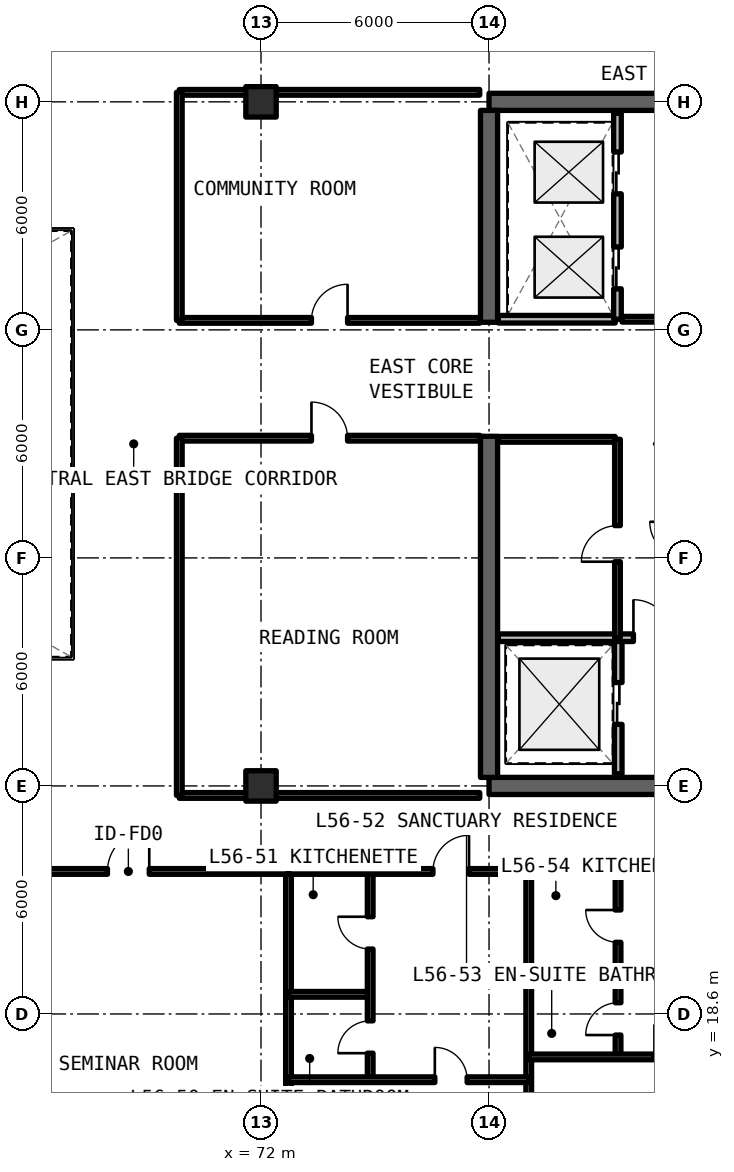
"""IFC4 building model, lengths in metres.
Left out: names, types, materials, properties, quantities, classifications, styles, units other than length and angle.
Written with IfcOpenShell. Run it as: python <this file> out.ifc"""

import sys

from ifc_helpers import new_model, si_unit, direction, frame, frame_2d, origin, origin_2d, place, context, subcontext, project, spatial, rectangle, extrude, element, fill, save


model = new_model("IFC4")
c1 = context("Model", 3, precision=1e-05, world=origin(), true_north=direction((0.0, 1.0)))
c2 = subcontext(c1, "Body", "Model", "MODEL_VIEW")
j1 = project(units=[si_unit("LENGTHUNIT", "METRE"), si_unit("PLANEANGLEUNIT", "RADIAN")], contexts=[c1])
p1 = place(None, origin())
s1 = spatial("IfcSite", under=j1, at=p1, CompositionType="ELEMENT")
p2 = place(p1, origin())
s2 = spatial("IfcBuilding", under=s1, at=p2, CompositionType="ELEMENT")
p3 = place(p2, frame((0.0, 0.0, 201.63)))
s3 = spatial("IfcBuildingStorey", under=s2, at=p3, CompositionType="ELEMENT", Elevation=201.63)
for number, where, z_axis, x_axis in (
    (1, (78.0, 24.6, 0.0), (0.0, 0.0, 1.0), (1.0, 0.0, 0.0)),
    (2, (90.0, 42.6, 0.0), (0.0, 0.0, 1.0), (-1.0, 0.0, 0.0)),
):
    element("IfcWall", number, at=place(p3, frame(where, z_axis=z_axis, x_axis=x_axis)), inside=s3, PredefinedType="SHEAR", context=c2, shape_type="SweptSolid", body=[
        extrude(rectangle(XDim=12.0, YDim=0.45, at=frame_2d((6.0, 0.0))), origin(), (0.0, 0.0, 1.0), 3.3),
    ])
p4 = place(p3, frame((78.0, 24.825, 0.0), z_axis=(0.0, 0.0, 1.0), x_axis=(0.0, 1.0, 0.0)))
e3 = element("IfcWall", 3, at=p4, inside=s3, PredefinedType="SHEAR", context=c2, shape_type="SweptSolid", body=[
    extrude(rectangle(XDim=8.975, YDim=0.45, at=frame_2d((4.488, 0.0))), origin(), (0.0, 0.0, 1.0), 3.3),
])
p5 = place(p3, frame((78.0, 36.8, 0.0), z_axis=(0.0, 0.0, 1.0), x_axis=(0.0, 1.0, 0.0)))
e4 = element("IfcWall", 4, at=p5, inside=s3, PredefinedType="SHEAR", context=c2, shape_type="SweptSolid", body=[
    extrude(rectangle(XDim=5.575, YDim=0.45, at=frame_2d((2.788, 0.0))), origin(), (0.0, 0.0, 1.0), 3.3),
])
for number, where, z_axis, x_axis in (
    (5, (72.0, 24.6, 0.0), (0.0, 0.0, 1.0), (1.0, 0.0, 0.0)),
    (6, (72.0, 42.6, 0.0), (0.0, 0.0, 1.0), (1.0, 0.0, 0.0)),
):
    element("IfcColumn", number, at=place(p3, frame(where, z_axis=z_axis, x_axis=x_axis)), inside=s3, PredefinedType="COLUMN", context=c2, shape_type="SweptSolid", body=[
        extrude(rectangle(XDim=0.8, YDim=0.8, at=origin_2d()), origin(), (0.0, 0.0, 1.0), 3.3),
    ])
p6 = place(p3, frame((81.4, 24.92, 0.0), z_axis=(0.0, 0.0, 1.0), x_axis=(0.0, 1.0, 0.0)))
e7 = element("IfcWall", 7, at=p6, inside=s3, PredefinedType="SOLIDWALL", context=c2, shape_type="SweptSolid", body=[
    extrude(rectangle(XDim=3.58, YDim=0.2, at=frame_2d((1.79, 0.0))), origin(), (0.0, 0.0, 1.0), 2.35),
])
p7 = place(p6, frame((1.3, 0.0, 0.0)))
e8 = element("IfcOpeningElement", 8, at=p7, cuts=e7, PredefinedType="OPENING", context=c2, shape_type="SweptSolid", body=[
    extrude(rectangle(XDim=1.1, YDim=2.2, at=frame_2d((0.55, 1.1))), frame((0.0, 0.11, 0.0), z_axis=(0.0, -1.0, 0.0), x_axis=(1.0, 0.0, 0.0)), (0.0, 0.0, 1.0), 0.22),
])
p8 = place(p3, frame((78.245, 28.5, 0.0), z_axis=(0.0, 0.0, 1.0), x_axis=(1.0, 0.0, 0.0)))
e9 = element("IfcWall", 9, at=p8, inside=s3, PredefinedType="SOLIDWALL", context=c2, shape_type="SweptSolid", body=[
    extrude(rectangle(XDim=7.585, YDim=0.2, at=frame_2d((3.792, 0.0))), origin(), (0.0, 0.0, 1.0), 2.35),
])
p9 = place(p8, frame((3.555, 0.0, 0.0)))
e10 = element("IfcOpeningElement", 10, at=p9, cuts=e9, PredefinedType="OPENING", context=c2, shape_type="SweptSolid", body=[
    extrude(rectangle(XDim=1.0, YDim=2.15, at=frame_2d((0.5, 1.075))), frame((0.0, 0.11, 0.0), z_axis=(0.0, -1.0, 0.0), x_axis=(1.0, 0.0, 0.0)), (0.0, 0.0, 1.0), 0.22),
])
p10 = place(p3, frame((78.245, 33.72, 0.0), z_axis=(0.0, 0.0, 1.0), x_axis=(1.0, 0.0, 0.0)))
e11 = element("IfcWall", 11, at=p10, inside=s3, PredefinedType="SOLIDWALL", context=c2, shape_type="SweptSolid", body=[
    extrude(rectangle(XDim=3.075, YDim=0.15, at=frame_2d((1.538, 0.0))), origin(), (0.0, 0.0, 1.0), 2.35),
])
p11 = place(p3, frame((81.38, 28.5, 0.0), z_axis=(0.0, 0.0, 1.0), x_axis=(0.0, 1.0, 0.0)))
e12 = element("IfcWall", 12, at=p11, inside=s3, PredefinedType="SOLIDWALL", context=c2, shape_type="SweptSolid", body=[
    extrude(rectangle(XDim=5.22, YDim=0.15, at=frame_2d((2.61, 0.0))), origin(), (0.0, 0.0, 1.0), 2.35),
])
p12 = place(p11, frame((2.0, 0.0, 0.0)))
e13 = element("IfcOpeningElement", 13, at=p12, cuts=e12, PredefinedType="OPENING", context=c2, shape_type="SweptSolid", body=[
    extrude(rectangle(XDim=0.95, YDim=2.15, at=frame_2d((0.475, 1.075))), frame((0.0, 0.085, 0.0), z_axis=(0.0, -1.0, 0.0), x_axis=(1.0, 0.0, 0.0)), (0.0, 0.0, 1.0), 0.17),
])
p13 = place(p3, frame((81.5, 36.88, 0.0), z_axis=(0.0, 0.0, 1.0), x_axis=(1.0, 0.0, 0.0)))
e14 = element("IfcWall", 14, at=p13, inside=s3, PredefinedType="SOLIDWALL", context=c2, shape_type="SweptSolid", body=[
    extrude(rectangle(XDim=4.33, YDim=0.15, at=frame_2d((2.165, 0.0))), origin(), (0.0, 0.0, 1.0), 2.35),
])
p14 = place(p13, frame((1.6, 0.0, 0.0)))
e15 = element("IfcOpeningElement", 15, at=p14, cuts=e14, PredefinedType="OPENING", context=c2, shape_type="SweptSolid", body=[
    extrude(rectangle(XDim=0.95, YDim=2.15, at=frame_2d((0.475, 1.075))), frame((0.0, 0.085, 0.0), z_axis=(0.0, -1.0, 0.0), x_axis=(1.0, 0.0, 0.0)), (0.0, 0.0, 1.0), 0.17),
])
p15 = place(p3, frame((78.245, 36.88, 0.0), z_axis=(0.0, 0.0, 1.0), x_axis=(1.0, 0.0, 0.0)))
e16 = element("IfcWall", 16, at=p15, inside=s3, PredefinedType="SOLIDWALL", context=c2, shape_type="SweptSolid", body=[
    extrude(rectangle(XDim=3.075, YDim=0.2, at=frame_2d((1.538, 0.0))), origin(), (0.0, 0.0, 1.0), 2.35),
])
p16 = place(p3, frame((81.38, 36.88, 0.0), z_axis=(0.0, 0.0, 1.0), x_axis=(0.0, 1.0, 0.0)))
e17 = element("IfcWall", 17, at=p16, inside=s3, PredefinedType="SOLIDWALL", context=c2, shape_type="SweptSolid", body=[
    extrude(rectangle(XDim=5.42, YDim=0.2, at=frame_2d((2.71, 0.0))), origin(), (0.0, 0.0, 1.0), 2.35),
])
p17 = place(p16, frame((0.8, 0.0, 0.0)))
e18 = element("IfcOpeningElement", 18, at=p17, cuts=e17, PredefinedType="OPENING", context=c2, shape_type="SweptSolid", body=[
    extrude(rectangle(XDim=1.1, YDim=2.2, at=frame_2d((0.55, 1.1))), frame((0.0, 0.11, 0.0), z_axis=(0.0, -1.0, 0.0), x_axis=(1.0, 0.0, 0.0)), (0.0, 0.0, 1.0), 0.22),
])
p18 = place(p16, frame((3.3, 0.0, 0.0)))
e19 = element("IfcOpeningElement", 19, at=p18, cuts=e17, PredefinedType="OPENING", context=c2, shape_type="SweptSolid", body=[
    extrude(rectangle(XDim=1.1, YDim=2.2, at=frame_2d((0.55, 1.1))), frame((0.0, 0.11, 0.0), z_axis=(0.0, -1.0, 0.0), x_axis=(1.0, 0.0, 0.0)), (0.0, 0.0, 1.0), 0.22),
])
p19 = place(p3, frame((69.85, 24.35, 0.0), z_axis=(0.0, 0.0, 1.0), x_axis=(1.0, 0.0, 0.0)))
e20 = element("IfcWall", 20, at=p19, inside=s3, PredefinedType="SOLIDWALL", context=c2, shape_type="SweptSolid", body=[
    extrude(rectangle(XDim=7.905, YDim=0.15, at=frame_2d((3.952, 0.0))), origin(), (0.0, 0.0, 1.0), 2.35),
])
p20 = place(p3, frame((69.85, 33.75, 0.0), z_axis=(0.0, 0.0, 1.0), x_axis=(1.0, 0.0, 0.0)))
e21 = element("IfcWall", 21, at=p20, inside=s3, PredefinedType="SOLIDWALL", context=c2, shape_type="SweptSolid", body=[
    extrude(rectangle(XDim=7.905, YDim=0.15, at=frame_2d((3.952, 0.0))), origin(), (0.0, 0.0, 1.0), 2.35),
])
p21 = place(p20, frame((3.478, 0.0, 0.0)))
e22 = element("IfcOpeningElement", 22, at=p21, cuts=e21, PredefinedType="OPENING", context=c2, shape_type="SweptSolid", body=[
    extrude(rectangle(XDim=0.95, YDim=2.15, at=frame_2d((0.475, 1.075))), frame((0.0, 0.085, 0.0), z_axis=(0.0, -1.0, 0.0), x_axis=(1.0, 0.0, 0.0)), (0.0, 0.0, 1.0), 0.17),
])
p22 = place(p3, frame((69.85, 24.35, 0.0), z_axis=(0.0, 0.0, 1.0), x_axis=(0.0, 1.0, 0.0)))
e23 = element("IfcWall", 23, at=p22, inside=s3, PredefinedType="SOLIDWALL", context=c2, shape_type="SweptSolid", body=[
    extrude(rectangle(XDim=9.4, YDim=0.15, at=frame_2d((4.7, 0.0))), origin(), (0.0, 0.0, 1.0), 2.35),
])
p23 = place(p3, frame((69.85, 36.85, 0.0), z_axis=(0.0, 0.0, 1.0), x_axis=(1.0, 0.0, 0.0)))
e24 = element("IfcWall", 24, at=p23, inside=s3, PredefinedType="SOLIDWALL", context=c2, shape_type="SweptSolid", body=[
    extrude(rectangle(XDim=7.905, YDim=0.15, at=frame_2d((3.952, 0.0))), origin(), (0.0, 0.0, 1.0), 2.35),
])
p24 = place(p23, frame((3.478, 0.0, 0.0)))
e25 = element("IfcOpeningElement", 25, at=p24, cuts=e24, PredefinedType="OPENING", context=c2, shape_type="SweptSolid", body=[
    extrude(rectangle(XDim=0.95, YDim=2.15, at=frame_2d((0.475, 1.075))), frame((0.0, 0.085, 0.0), z_axis=(0.0, -1.0, 0.0), x_axis=(1.0, 0.0, 0.0)), (0.0, 0.0, 1.0), 0.17),
])
p25 = place(p3, frame((69.85, 42.85, 0.0), z_axis=(0.0, 0.0, 1.0), x_axis=(1.0, 0.0, 0.0)))
e26 = element("IfcWall", 26, at=p25, inside=s3, PredefinedType="SOLIDWALL", context=c2, shape_type="SweptSolid", body=[
    extrude(rectangle(XDim=7.905, YDim=0.15, at=frame_2d((3.952, 0.0))), origin(), (0.0, 0.0, 1.0), 2.35),
])
p26 = place(p3, frame((69.85, 36.85, 0.0), z_axis=(0.0, 0.0, 1.0), x_axis=(0.0, 1.0, 0.0)))
e27 = element("IfcWall", 27, at=p26, inside=s3, PredefinedType="SOLIDWALL", context=c2, shape_type="SweptSolid", body=[
    extrude(rectangle(XDim=6.0, YDim=0.15, at=frame_2d((3.0, 0.0))), origin(), (0.0, 0.0, 1.0), 2.35),
])
p27 = place(p3, frame((72.723, 12.27, 0.0), z_axis=(0.0, 0.0, 1.0), x_axis=(0.0, 1.0, 0.0)))
e28 = element("IfcWall", 28, at=p27, inside=s3, PredefinedType="SOLIDWALL", context=c2, shape_type="SweptSolid", body=[
    extrude(rectangle(XDim=10.08, YDim=0.15, at=frame_2d((5.04, 0.0))), origin(), (0.0, 0.0, 1.0), 2.35),
])
p28 = place(p3, frame((64.295, 22.35, 0.0), z_axis=(0.0, 0.0, 1.0), x_axis=(1.0, 0.0, 0.0)))
e29 = element("IfcWall", 29, at=p28, inside=s3, PredefinedType="SOLIDWALL", context=c2, shape_type="SweptSolid", body=[
    extrude(rectangle(XDim=8.428, YDim=0.15, at=frame_2d((4.214, 0.0))), origin(), (0.0, 0.0, 1.0), 2.35),
])
p29 = place(p28, frame((3.664, 0.0, 0.0)))
e30 = element("IfcOpeningElement", 30, at=p29, cuts=e29, PredefinedType="OPENING", context=c2, shape_type="SweptSolid", body=[
    extrude(rectangle(XDim=1.1, YDim=2.15, at=frame_2d((0.55, 1.075))), frame((0.0, 0.085, 0.0), z_axis=(0.0, -1.0, 0.0), x_axis=(1.0, 0.0, 0.0)), (0.0, 0.0, 1.0), 0.17),
])
p30 = place(p3, frame((79.045, 12.27, 0.0), z_axis=(0.0, 0.0, 1.0), x_axis=(0.0, 1.0, 0.0)))
e31 = element("IfcWall", 31, at=p30, inside=s3, PredefinedType="SOLIDWALL", context=c2, shape_type="SweptSolid", body=[
    extrude(rectangle(XDim=10.08, YDim=0.15, at=frame_2d((5.04, 0.0))), origin(), (0.0, 0.0, 1.0), 2.35),
])
p31 = place(p3, frame((72.723, 19.117, 0.0), z_axis=(0.0, 0.0, 1.0), x_axis=(1.0, 0.0, 0.0)))
e32 = element("IfcWall", 32, at=p31, inside=s3, PredefinedType="PARTITIONING", context=c2, shape_type="SweptSolid", body=[
    extrude(rectangle(XDim=2.149, YDim=0.15, at=frame_2d((1.075, 0.0))), origin(), (0.0, 0.0, 1.0), 2.35),
])
p32 = place(p3, frame((74.873, 16.87, 0.0), z_axis=(0.0, 0.0, 1.0), x_axis=(0.0, 1.0, 0.0)))
e33 = element("IfcWall", 33, at=p32, inside=s3, PredefinedType="PARTITIONING", context=c2, shape_type="SweptSolid", body=[
    extrude(rectangle(XDim=5.48, YDim=0.15, at=frame_2d((2.74, 0.0))), origin(), (0.0, 0.0, 1.0), 2.35),
])
p33 = place(p32, frame((0.698, 0.0, 0.0)))
e34 = element("IfcOpeningElement", 34, at=p33, cuts=e33, PredefinedType="OPENING", context=c2, shape_type="SweptSolid", body=[
    extrude(rectangle(XDim=0.85, YDim=2.1, at=frame_2d((0.425, 1.05))), frame((0.0, 0.085, 0.0), z_axis=(0.0, -1.0, 0.0), x_axis=(1.0, 0.0, 0.0)), (0.0, 0.0, 1.0), 0.17),
])
p34 = place(p32, frame((3.438, 0.0, 0.0)))
e35 = element("IfcOpeningElement", 35, at=p34, cuts=e33, PredefinedType="OPENING", context=c2, shape_type="SweptSolid", body=[
    extrude(rectangle(XDim=0.85, YDim=2.1, at=frame_2d((0.425, 1.05))), frame((0.0, 0.085, 0.0), z_axis=(0.0, -1.0, 0.0), x_axis=(1.0, 0.0, 0.0)), (0.0, 0.0, 1.0), 0.17),
])
p35 = place(p3, frame((72.723, 16.87, 0.0), z_axis=(0.0, 0.0, 1.0), x_axis=(1.0, 0.0, 0.0)))
e36 = element("IfcWall", 36, at=p35, inside=s3, PredefinedType="PARTITIONING", context=c2, shape_type="SweptSolid", body=[
    extrude(rectangle(XDim=6.322, YDim=0.15, at=frame_2d((3.161, 0.0))), origin(), (0.0, 0.0, 1.0), 2.35),
])
p36 = place(p35, frame((3.85, 0.0, 0.0)))
e37 = element("IfcOpeningElement", 37, at=p36, cuts=e36, PredefinedType="OPENING", context=c2, shape_type="SweptSolid", body=[
    extrude(rectangle(XDim=0.85, YDim=2.1, at=frame_2d((0.425, 1.05))), frame((0.0, 0.085, 0.0), z_axis=(0.0, -1.0, 0.0), x_axis=(1.0, 0.0, 0.0)), (0.0, 0.0, 1.0), 0.17),
])
p37 = place(p3, frame((72.723, 22.35, 0.0), z_axis=(0.0, 0.0, 1.0), x_axis=(1.0, 0.0, 0.0)))
e38 = element("IfcWall", 38, at=p37, inside=s3, PredefinedType="SOLIDWALL", context=c2, shape_type="SweptSolid", body=[
    extrude(rectangle(XDim=6.322, YDim=0.15, at=frame_2d((3.161, 0.0))), origin(), (0.0, 0.0, 1.0), 2.35),
])
p38 = place(p37, frame((3.8, 0.0, 0.0)))
e39 = element("IfcOpeningElement", 39, at=p38, cuts=e38, PredefinedType="OPENING", context=c2, shape_type="SweptSolid", body=[
    extrude(rectangle(XDim=0.95, YDim=2.15, at=frame_2d((0.475, 1.075))), frame((0.0, 0.085, 0.0), z_axis=(0.0, -1.0, 0.0), x_axis=(1.0, 0.0, 0.0)), (0.0, 0.0, 1.0), 0.17),
])
p39 = place(p3, frame((79.045, 19.471, 0.0), z_axis=(0.0, 0.0, 1.0), x_axis=(1.0, 0.0, 0.0)))
e40 = element("IfcWall", 40, at=p39, inside=s3, PredefinedType="PARTITIONING", context=c2, shape_type="SweptSolid", body=[
    extrude(rectangle(XDim=2.35, YDim=0.15, at=frame_2d((1.175, 0.0))), origin(), (0.0, 0.0, 1.0), 2.35),
])
p40 = place(p3, frame((81.395, 17.47, 0.0), z_axis=(0.0, 0.0, 1.0), x_axis=(0.0, 1.0, 0.0)))
e41 = element("IfcWall", 41, at=p40, inside=s3, PredefinedType="PARTITIONING", context=c2, shape_type="SweptSolid", body=[
    extrude(rectangle(XDim=4.88, YDim=0.15, at=frame_2d((2.44, 0.0))), origin(), (0.0, 0.0, 1.0), 2.35),
])
p41 = place(p40, frame((0.575, 0.0, 0.0)))
e42 = element("IfcOpeningElement", 42, at=p41, cuts=e41, PredefinedType="OPENING", context=c2, shape_type="SweptSolid", body=[
    extrude(rectangle(XDim=0.85, YDim=2.1, at=frame_2d((0.425, 1.05))), frame((0.0, 0.085, 0.0), z_axis=(0.0, -1.0, 0.0), x_axis=(1.0, 0.0, 0.0)), (0.0, 0.0, 1.0), 0.17),
])
p42 = place(p40, frame((3.015, 0.0, 0.0)))
e43 = element("IfcOpeningElement", 43, at=p42, cuts=e41, PredefinedType="OPENING", context=c2, shape_type="SweptSolid", body=[
    extrude(rectangle(XDim=0.85, YDim=2.1, at=frame_2d((0.425, 1.05))), frame((0.0, 0.085, 0.0), z_axis=(0.0, -1.0, 0.0), x_axis=(1.0, 0.0, 0.0)), (0.0, 0.0, 1.0), 0.17),
])
p43 = place(p3, frame((79.045, 17.47, 0.0), z_axis=(0.0, 0.0, 1.0), x_axis=(1.0, 0.0, 0.0)))
e44 = element("IfcWall", 44, at=p43, inside=s3, PredefinedType="PARTITIONING", context=c2, shape_type="SweptSolid", body=[
    extrude(rectangle(XDim=9.833, YDim=0.15, at=frame_2d((4.917, 0.0))), origin(), (0.0, 0.0, 1.0), 2.35),
])
p44 = place(p43, frame((3.307, 0.0, 0.0)))
e45 = element("IfcOpeningElement", 45, at=p44, cuts=e44, PredefinedType="OPENING", context=c2, shape_type="SweptSolid", body=[
    extrude(rectangle(XDim=0.85, YDim=2.1, at=frame_2d((0.425, 1.05))), frame((0.0, 0.085, 0.0), z_axis=(0.0, -1.0, 0.0), x_axis=(1.0, 0.0, 0.0)), (0.0, 0.0, 1.0), 0.17),
])
p45 = place(p43, frame((7.048, 0.0, 0.0)))
e46 = element("IfcOpeningElement", 46, at=p45, cuts=e44, PredefinedType="OPENING", context=c2, shape_type="SweptSolid", body=[
    extrude(rectangle(XDim=0.85, YDim=2.1, at=frame_2d((0.425, 1.05))), frame((0.0, 0.085, 0.0), z_axis=(0.0, -1.0, 0.0), x_axis=(1.0, 0.0, 0.0)), (0.0, 0.0, 1.0), 0.17),
])
p46 = place(p3, frame((79.045, 22.35, 0.0), z_axis=(0.0, 0.0, 1.0), x_axis=(1.0, 0.0, 0.0)))
e47 = element("IfcWall", 47, at=p46, inside=s3, PredefinedType="SOLIDWALL", context=c2, shape_type="SweptSolid", body=[
    extrude(rectangle(XDim=9.833, YDim=0.15, at=frame_2d((4.917, 0.0))), origin(), (0.0, 0.0, 1.0), 2.35),
])
p47 = place(p46, frame((5.657, 0.0, 0.0)))
e48 = element("IfcOpeningElement", 48, at=p47, cuts=e47, PredefinedType="OPENING", context=c2, shape_type="SweptSolid", body=[
    extrude(rectangle(XDim=0.95, YDim=2.15, at=frame_2d((0.475, 1.075))), frame((0.0, 0.085, 0.0), z_axis=(0.0, -1.0, 0.0), x_axis=(1.0, 0.0, 0.0)), (0.0, 0.0, 1.0), 0.17),
])
p48 = place(p7, origin())
e49 = element("IfcDoor", 49, at=p48, inside=s3, OperationType="SLIDING_TO_LEFT", PredefinedType="DOOR", context=c2, shape_type="SweptSolid", body=[
    extrude(rectangle(XDim=1.1, YDim=2.2, at=frame_2d((0.55, 1.1))), frame((0.0, 0.025, 0.0), z_axis=(0.0, -1.0, 0.0), x_axis=(1.0, 0.0, 0.0)), (0.0, 0.0, 1.0), 0.05),
])
fill(e8, e49)
p49 = place(p9, origin())
e50 = element("IfcDoor", 50, at=p49, inside=s3, OperationType="SINGLE_SWING_LEFT", PredefinedType="DOOR", context=c2, shape_type="SweptSolid", body=[
    extrude(rectangle(XDim=1.0, YDim=2.15, at=frame_2d((0.5, 1.075))), frame((0.0, 0.025, 0.0), z_axis=(0.0, -1.0, 0.0), x_axis=(1.0, 0.0, 0.0)), (0.0, 0.0, 1.0), 0.05),
])
fill(e10, e50)
p50 = place(p12, origin())
e51 = element("IfcDoor", 51, at=p50, inside=s3, OperationType="SINGLE_SWING_LEFT", PredefinedType="DOOR", context=c2, shape_type="SweptSolid", body=[
    extrude(rectangle(XDim=0.95, YDim=2.15, at=frame_2d((0.475, 1.075))), frame((0.0, 0.025, 0.0), z_axis=(0.0, -1.0, 0.0), x_axis=(1.0, 0.0, 0.0)), (0.0, 0.0, 1.0), 0.05),
])
fill(e13, e51)
p51 = place(p17, origin())
e52 = element("IfcDoor", 52, at=p51, inside=s3, OperationType="SLIDING_TO_LEFT", PredefinedType="DOOR", context=c2, shape_type="SweptSolid", body=[
    extrude(rectangle(XDim=1.1, YDim=2.2, at=frame_2d((0.55, 1.1))), frame((0.0, 0.025, 0.0), z_axis=(0.0, -1.0, 0.0), x_axis=(1.0, 0.0, 0.0)), (0.0, 0.0, 1.0), 0.05),
])
fill(e18, e52)
p52 = place(p18, origin())
e53 = element("IfcDoor", 53, at=p52, inside=s3, OperationType="SLIDING_TO_RIGHT", PredefinedType="DOOR", context=c2, shape_type="SweptSolid", body=[
    extrude(rectangle(XDim=1.1, YDim=2.2, at=frame_2d((0.55, 1.1))), frame((0.0, 0.025, 0.0), z_axis=(0.0, -1.0, 0.0), x_axis=(1.0, 0.0, 0.0)), (0.0, 0.0, 1.0), 0.05),
])
fill(e19, e53)
p53 = place(p21, origin())
e54 = element("IfcDoor", 54, at=p53, inside=s3, OperationType="SINGLE_SWING_LEFT", PredefinedType="DOOR", context=c2, shape_type="SweptSolid", body=[
    extrude(rectangle(XDim=0.95, YDim=2.15, at=frame_2d((0.475, 1.075))), frame((0.0, 0.025, 0.0), z_axis=(0.0, -1.0, 0.0), x_axis=(1.0, 0.0, 0.0)), (0.0, 0.0, 1.0), 0.05),
])
fill(e22, e54)
p54 = place(p24, origin())
e55 = element("IfcDoor", 55, at=p54, inside=s3, OperationType="SINGLE_SWING_RIGHT", PredefinedType="DOOR", context=c2, shape_type="SweptSolid", body=[
    extrude(rectangle(XDim=0.95, YDim=2.15, at=frame_2d((0.475, 1.075))), frame((0.0, 0.025, 0.0), z_axis=(0.0, -1.0, 0.0), x_axis=(1.0, 0.0, 0.0)), (0.0, 0.0, 1.0), 0.05),
])
fill(e25, e55)
p55 = place(p29, origin())
e56 = element("IfcDoor", 56, at=p55, inside=s3, OperationType="SINGLE_SWING_RIGHT", PredefinedType="DOOR", context=c2, shape_type="SweptSolid", body=[
    extrude(rectangle(XDim=1.1, YDim=2.15, at=frame_2d((0.55, 1.075))), frame((0.0, 0.025, 0.0), z_axis=(0.0, -1.0, 0.0), x_axis=(1.0, 0.0, 0.0)), (0.0, 0.0, 1.0), 0.05),
])
fill(e30, e56)
p56 = place(p33, origin())
e57 = element("IfcDoor", 57, at=p56, inside=s3, OperationType="SINGLE_SWING_LEFT", PredefinedType="DOOR", context=c2, shape_type="SweptSolid", body=[
    extrude(rectangle(XDim=0.85, YDim=2.1, at=frame_2d((0.425, 1.05))), frame((0.0, 0.025, 0.0), z_axis=(0.0, -1.0, 0.0), x_axis=(1.0, 0.0, 0.0)), (0.0, 0.0, 1.0), 0.05),
])
fill(e34, e57)
p57 = place(p34, origin())
e58 = element("IfcDoor", 58, at=p57, inside=s3, OperationType="SINGLE_SWING_RIGHT", PredefinedType="DOOR", context=c2, shape_type="SweptSolid", body=[
    extrude(rectangle(XDim=0.85, YDim=2.1, at=frame_2d((0.425, 1.05))), frame((0.0, 0.025, 0.0), z_axis=(0.0, -1.0, 0.0), x_axis=(1.0, 0.0, 0.0)), (0.0, 0.0, 1.0), 0.05),
])
fill(e35, e58)
p58 = place(p36, origin())
e59 = element("IfcDoor", 59, at=p58, inside=s3, OperationType="SINGLE_SWING_LEFT", PredefinedType="DOOR", context=c2, shape_type="SweptSolid", body=[
    extrude(rectangle(XDim=0.85, YDim=2.1, at=frame_2d((0.425, 1.05))), frame((0.0, 0.025, 0.0), z_axis=(0.0, -1.0, 0.0), x_axis=(1.0, 0.0, 0.0)), (0.0, 0.0, 1.0), 0.05),
])
fill(e37, e59)
p59 = place(p38, origin())
e60 = element("IfcDoor", 60, at=p59, inside=s3, OperationType="SINGLE_SWING_RIGHT", PredefinedType="DOOR", context=c2, shape_type="SweptSolid", body=[
    extrude(rectangle(XDim=0.95, YDim=2.15, at=frame_2d((0.475, 1.075))), frame((0.0, 0.025, 0.0), z_axis=(0.0, -1.0, 0.0), x_axis=(1.0, 0.0, 0.0)), (0.0, 0.0, 1.0), 0.05),
])
fill(e39, e60)
p60 = place(p41, origin())
e61 = element("IfcDoor", 61, at=p60, inside=s3, OperationType="SINGLE_SWING_LEFT", PredefinedType="DOOR", context=c2, shape_type="SweptSolid", body=[
    extrude(rectangle(XDim=0.85, YDim=2.1, at=frame_2d((0.425, 1.05))), frame((0.0, 0.025, 0.0), z_axis=(0.0, -1.0, 0.0), x_axis=(1.0, 0.0, 0.0)), (0.0, 0.0, 1.0), 0.05),
])
fill(e42, e61)
p61 = place(p42, origin())
e62 = element("IfcDoor", 62, at=p61, inside=s3, OperationType="SINGLE_SWING_RIGHT", PredefinedType="DOOR", context=c2, shape_type="SweptSolid", body=[
    extrude(rectangle(XDim=0.85, YDim=2.1, at=frame_2d((0.425, 1.05))), frame((0.0, 0.025, 0.0), z_axis=(0.0, -1.0, 0.0), x_axis=(1.0, 0.0, 0.0)), (0.0, 0.0, 1.0), 0.05),
])
fill(e43, e62)
save(model, sys.argv[1])
